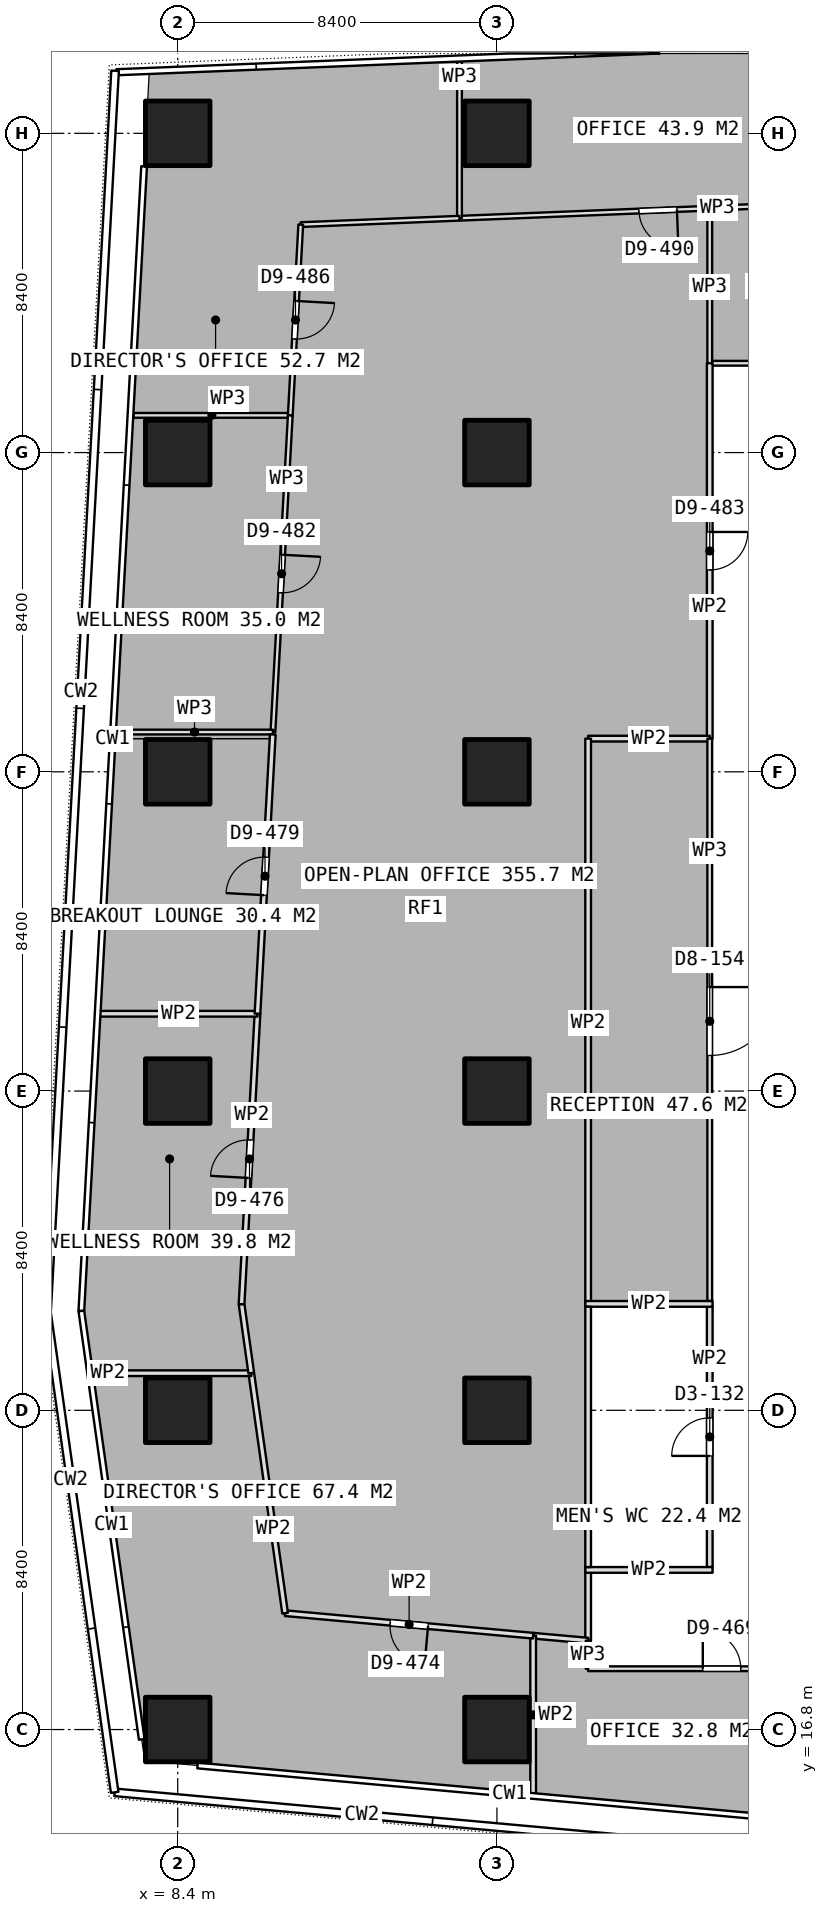
"""IFC4 building model, lengths in metres.
Left out: names, types, materials, properties, quantities, classifications, styles, units other than length and angle.
Written with IfcOpenShell. Run it as: python <this file> out.ifc"""

import sys

from ifc_helpers import new_model, si_unit, direction, frame, frame_2d, origin, origin_2d, place, context, subcontext, project, spatial, rectangle, extrude, element, fill, save


model = new_model("IFC4")
c1 = context("Model", 3, precision=1e-05, world=origin(), true_north=direction((0.0, 1.0)))
c2 = subcontext(c1, "Body", "Model", "MODEL_VIEW")
j1 = project(units=[si_unit("LENGTHUNIT", "METRE"), si_unit("PLANEANGLEUNIT", "RADIAN")], contexts=[c1])
p1 = place(None, origin())
s1 = spatial("IfcSite", under=j1, at=p1, CompositionType="ELEMENT")
p2 = place(p1, origin())
s2 = spatial("IfcBuilding", under=s1, at=p2, CompositionType="ELEMENT")
p3 = place(p2, frame((0.0, 0.0, 125.3)))
s3 = spatial("IfcBuildingStorey", under=s2, at=p3, CompositionType="ELEMENT", Elevation=125.3)
for number, where, z_axis, x_axis in (
    (1, (8.4, 16.8, 0.0), (0.0, 0.0, 1.0), (1.0, 0.0, 0.0)),
    (2, (8.4, 25.2, 0.0), (0.0, 0.0, 1.0), (1.0, 0.0, 0.0)),
    (3, (8.4, 33.6, 0.0), (0.0, 0.0, 1.0), (1.0, 0.0, 0.0)),
    (4, (8.4, 42.0, 0.0), (0.0, 0.0, 1.0), (1.0, 0.0, 0.0)),
    (5, (8.4, 50.4, 0.0), (0.0, 0.0, 1.0), (1.0, 0.0, 0.0)),
    (6, (8.4, 58.8, 0.0), (0.0, 0.0, 1.0), (1.0, 0.0, 0.0)),
    (7, (16.8, 16.8, 0.0), (0.0, 0.0, 1.0), (1.0, 0.0, 0.0)),
    (8, (16.8, 25.2, 0.0), (0.0, 0.0, 1.0), (1.0, 0.0, 0.0)),
    (9, (16.8, 33.6, 0.0), (0.0, 0.0, 1.0), (1.0, 0.0, 0.0)),
    (10, (16.8, 42.0, 0.0), (0.0, 0.0, 1.0), (1.0, 0.0, 0.0)),
    (11, (16.8, 50.4, 0.0), (0.0, 0.0, 1.0), (1.0, 0.0, 0.0)),
    (12, (16.8, 58.8, 0.0), (0.0, 0.0, 1.0), (1.0, 0.0, 0.0)),
):
    element("IfcColumn", number, at=place(p3, frame(where, z_axis=z_axis, x_axis=x_axis)), inside=s3, PredefinedType="COLUMN", context=c2, shape_type="SweptSolid", body=[
        extrude(rectangle(XDim=1.7, YDim=1.7, at=origin_2d()), origin(), (0.0, 0.0, 1.0), 3.75),
    ])
for number, where, z_axis, x_axis in (
    (13, (19.125, 21.0, 0.0), (0.0, 0.0, 1.0), (1.0, 0.0, 0.0)),
    (14, (19.125, 28.0, 0.0), (0.0, 0.0, 1.0), (1.0, 0.0, 0.0)),
):
    element("IfcWall", number, at=place(p3, frame(where, z_axis=z_axis, x_axis=x_axis)), inside=s3, PredefinedType="PARTITIONING", context=c2, shape_type="SweptSolid", body=[
        extrude(rectangle(XDim=3.35, YDim=0.15, at=frame_2d((1.675, 0.0))), origin(), (0.0, 0.0, 1.0), 3.5),
    ])
p4 = place(p3, frame((19.2, 21.075, 0.0), z_axis=(0.0, 0.0, 1.0), x_axis=(0.0, 1.0, 0.0)))
e15 = element("IfcWall", 15, at=p4, inside=s3, PredefinedType="PARTITIONING", context=c2, shape_type="SweptSolid", body=[
    extrude(rectangle(XDim=6.85, YDim=0.15, at=frame_2d((3.425, 0.0))), origin(), (0.0, 0.0, 1.0), 3.5),
])
p5 = place(p3, frame((22.4, 21.075, 0.0), z_axis=(0.0, 0.0, 1.0), x_axis=(0.0, 1.0, 0.0)))
e16 = element("IfcWall", 16, at=p5, inside=s3, PredefinedType="PARTITIONING", context=c2, shape_type="SweptSolid", body=[
    extrude(rectangle(XDim=6.85, YDim=0.15, at=frame_2d((3.425, 0.0))), origin(), (0.0, 0.0, 1.0), 3.5),
])
p6 = place(p5, frame((2.925, 0.0, 0.0)))
e17 = element("IfcOpeningElement", 17, at=p6, cuts=e16, PredefinedType="OPENING", context=c2, shape_type="SweptSolid", body=[
    extrude(rectangle(XDim=1.0, YDim=2.1, at=frame_2d((0.5, 1.05))), frame((0.0, 0.085, 0.0), z_axis=(0.0, -1.0, 0.0), x_axis=(1.0, 0.0, 0.0)), (0.0, 0.0, 1.0), 0.17),
])
p7 = place(p3, frame((26.257, 56.984, 0.0), z_axis=(0.0, 0.0, 1.0), x_axis=(-0.999199876108, -0.039995094524, 0.0)))
e18 = element("IfcWall", 18, at=p7, inside=s3, PredefinedType="PARTITIONING", context=c2, shape_type="SweptSolid", body=[
    extrude(rectangle(XDim=10.45, YDim=0.125, at=frame_2d((5.225, 0.0))), origin(), (0.0, 0.0, 1.0), 3.5),
])
p8 = place(p7, frame((4.725, 0.0, 0.0)))
e19 = element("IfcOpeningElement", 19, at=p8, cuts=e18, PredefinedType="OPENING", context=c2, shape_type="SweptSolid", body=[
    extrude(rectangle(XDim=1.0, YDim=2.1, at=frame_2d((0.5, 1.05))), frame((0.0, 0.073, 0.0), z_axis=(0.0, -1.0, 0.0), x_axis=(1.0, 0.0, 0.0)), (0.0, 0.0, 1.0), 0.145),
])
p9 = place(p3, frame((15.815, 56.566, 0.0), z_axis=(0.0, 0.0, 1.0), x_axis=(0.0, 1.0, 0.0)))
e20 = element("IfcWall", 20, at=p9, inside=s3, PredefinedType="PARTITIONING", context=c2, shape_type="SweptSolid", body=[
    extrude(rectangle(XDim=4.123, YDim=0.125, at=frame_2d((2.062, 0.0))), origin(), (0.0, 0.0, 1.0), 3.5),
])
p10 = place(p3, frame((11.362, 51.379, 0.0), z_axis=(0.0, 0.0, 1.0), x_axis=(-1.0, 0.0, 0.0)))
e21 = element("IfcWall", 21, at=p10, inside=s3, PredefinedType="PARTITIONING", context=c2, shape_type="SweptSolid", body=[
    extrude(rectangle(XDim=4.126, YDim=0.125, at=frame_2d((2.063, 0.0))), origin(), (0.0, 0.0, 1.0), 3.5),
])
p11 = place(p3, frame((15.814, 56.566, 0.0), z_axis=(0.0, 0.0, 1.0), x_axis=(-0.999192069217, -0.040189660545, 0.0)))
e22 = element("IfcWall", 22, at=p11, inside=s3, PredefinedType="PARTITIONING", context=c2, shape_type="SweptSolid", body=[
    extrude(rectangle(XDim=4.179, YDim=0.125, at=frame_2d((2.09, 0.0))), origin(), (0.0, 0.0, 1.0), 3.5),
])
p12 = place(p3, frame((11.638, 56.398, 0.0), z_axis=(0.0, 0.0, 1.0), x_axis=(-0.05488358881, -0.998492759953, 0.0)))
e23 = element("IfcWall", 23, at=p12, inside=s3, PredefinedType="PARTITIONING", context=c2, shape_type="SweptSolid", body=[
    extrude(rectangle(XDim=5.027, YDim=0.125, at=frame_2d((2.513, 0.0))), origin(), (0.0, 0.0, 1.0), 3.5),
])
p13 = place(p12, frame((2.013, 0.0, 0.0)))
e24 = element("IfcOpeningElement", 24, at=p13, cuts=e23, PredefinedType="OPENING", context=c2, shape_type="SweptSolid", body=[
    extrude(rectangle(XDim=1.0, YDim=2.1, at=frame_2d((0.5, 1.05))), frame((0.0, 0.073, 0.0), z_axis=(0.0, -1.0, 0.0), x_axis=(1.0, 0.0, 0.0)), (0.0, 0.0, 1.0), 0.145),
])
p14 = place(p3, frame((11.362, 51.378, 0.0), z_axis=(0.0, 0.0, 1.0), x_axis=(-0.054769987218, -0.998498997746, 0.0)))
e25 = element("IfcWall", 25, at=p14, inside=s3, PredefinedType="PARTITIONING", context=c2, shape_type="SweptSolid", body=[
    extrude(rectangle(XDim=8.344, YDim=0.125, at=frame_2d((4.172, 0.0))), origin(), (0.0, 0.0, 1.0), 3.5),
])
p15 = place(p14, frame((3.672, 0.0, 0.0)))
e26 = element("IfcOpeningElement", 26, at=p15, cuts=e25, PredefinedType="OPENING", context=c2, shape_type="SweptSolid", body=[
    extrude(rectangle(XDim=1.0, YDim=2.1, at=frame_2d((0.5, 1.05))), frame((0.0, 0.073, 0.0), z_axis=(0.0, -1.0, 0.0), x_axis=(1.0, 0.0, 0.0)), (0.0, 0.0, 1.0), 0.145),
])
p16 = place(p3, frame((10.905, 43.046, 0.0), z_axis=(0.0, 0.0, 1.0), x_axis=(-1.0, 0.0, 0.0)))
e27 = element("IfcWall", 27, at=p16, inside=s3, PredefinedType="PARTITIONING", context=c2, shape_type="SweptSolid", body=[
    extrude(rectangle(XDim=4.126, YDim=0.125, at=frame_2d((2.063, 0.0))), origin(), (0.0, 0.0, 1.0), 3.5),
])
p17 = place(p3, frame((29.6, 52.75, 0.0), z_axis=(0.0, 0.0, 1.0), x_axis=(-1.0, 0.0, 0.0)))
e28 = element("IfcWall", 28, at=p17, inside=s3, PredefinedType="PARTITIONING", context=c2, shape_type="SweptSolid", body=[
    extrude(rectangle(XDim=7.2, YDim=0.125, at=frame_2d((3.6, 0.0))), origin(), (0.0, 0.0, 1.0), 3.5),
])
p18 = place(p17, frame((3.1, 0.0, 0.0)))
e29 = element("IfcOpeningElement", 29, at=p18, cuts=e28, PredefinedType="OPENING", context=c2, shape_type="SweptSolid", body=[
    extrude(rectangle(XDim=1.0, YDim=2.1, at=frame_2d((0.5, 1.05))), frame((0.0, 0.073, 0.0), z_axis=(0.0, -1.0, 0.0), x_axis=(1.0, 0.0, 0.0)), (0.0, 0.0, 1.0), 0.145),
])
p19 = place(p3, frame((22.4, 52.75, 0.0), z_axis=(0.0, 0.0, 1.0), x_axis=(0.0, 1.0, 0.0)))
e30 = element("IfcWall", 30, at=p19, inside=s3, PredefinedType="PARTITIONING", context=c2, shape_type="SweptSolid", body=[
    extrude(rectangle(XDim=4.017, YDim=0.125, at=frame_2d((2.009, 0.0))), origin(), (0.0, 0.0, 1.0), 3.5),
])
p20 = place(p3, frame((22.4, 52.75, 0.0), z_axis=(0.0, 0.0, 1.0), x_axis=(0.0, -1.0, 0.0)))
e31 = element("IfcWall", 31, at=p20, inside=s3, PredefinedType="PARTITIONING", context=c2, shape_type="SweptSolid", body=[
    extrude(rectangle(XDim=9.877, YDim=0.15, at=frame_2d((4.938, 0.0))), origin(), (0.0, 0.0, 1.0), 3.5),
])
p21 = place(p20, frame((4.439, 0.0, 0.0)))
e32 = element("IfcOpeningElement", 32, at=p21, cuts=e31, PredefinedType="OPENING", context=c2, shape_type="SweptSolid", body=[
    extrude(rectangle(XDim=1.0, YDim=2.1, at=frame_2d((0.5, 1.05))), frame((0.0, 0.085, 0.0), z_axis=(0.0, -1.0, 0.0), x_axis=(1.0, 0.0, 0.0)), (0.0, 0.0, 1.0), 0.17),
])
p22 = place(p3, frame((22.4, 42.873, 0.0), z_axis=(0.0, 0.0, 1.0), x_axis=(-1.0, 0.0, 0.0)))
e33 = element("IfcWall", 33, at=p22, inside=s3, PredefinedType="PARTITIONING", context=c2, shape_type="SweptSolid", body=[
    extrude(rectangle(XDim=3.2, YDim=0.15, at=frame_2d((1.6, 0.0))), origin(), (0.0, 0.0, 1.0), 3.5),
])
p23 = place(p3, frame((19.2, 42.873, 0.0), z_axis=(0.0, 0.0, 1.0), x_axis=(0.0, -1.0, 0.0)))
e34 = element("IfcWall", 34, at=p23, inside=s3, PredefinedType="PARTITIONING", context=c2, shape_type="SweptSolid", body=[
    extrude(rectangle(XDim=14.948, YDim=0.15, at=frame_2d((7.474, 0.0))), origin(), (0.0, 0.0, 1.0), 3.5),
])
p24 = place(p3, frame((19.2, 21.075, 0.0), z_axis=(0.0, 0.0, 1.0), x_axis=(0.0, -1.0, 0.0)))
e35 = element("IfcWall", 35, at=p24, inside=s3, PredefinedType="PARTITIONING", context=c2, shape_type="SweptSolid", body=[
    extrude(rectangle(XDim=1.937, YDim=0.15, at=frame_2d((0.969, 0.0))), origin(), (0.0, 0.0, 1.0), 3.5),
])
p25 = place(p3, frame((19.2, 19.138, 0.0), z_axis=(0.0, 0.0, 1.0), x_axis=(-0.995920706464, 0.090232734836, 0.0)))
e36 = element("IfcWall", 36, at=p25, inside=s3, PredefinedType="PARTITIONING", context=c2, shape_type="SweptSolid", body=[
    extrude(rectangle(XDim=1.453, YDim=0.15, at=frame_2d((0.727, 0.0))), origin(), (0.0, 0.0, 1.0), 3.5),
])
p26 = place(p3, frame((17.753, 19.269, 0.0), z_axis=(0.0, 0.0, 1.0), x_axis=(0.0, -1.0, 0.0)))
e37 = element("IfcWall", 37, at=p26, inside=s3, PredefinedType="PARTITIONING", context=c2, shape_type="SweptSolid", body=[
    extrude(rectangle(XDim=4.167, YDim=0.15, at=frame_2d((2.083, 0.0))), origin(), (0.0, 0.0, 1.0), 3.5),
])
p27 = place(p3, frame((17.752, 19.269, 0.0), z_axis=(0.0, 0.0, 1.0), x_axis=(-0.995896565077, 0.090498793736, 0.0)))
e38 = element("IfcWall", 38, at=p27, inside=s3, PredefinedType="PARTITIONING", context=c2, shape_type="SweptSolid", body=[
    extrude(rectangle(XDim=6.553, YDim=0.15, at=frame_2d((3.276, 0.0))), origin(), (0.0, 0.0, 1.0), 3.5),
])
p28 = place(p27, frame((2.776, 0.0, 0.0)))
e39 = element("IfcOpeningElement", 39, at=p28, cuts=e38, PredefinedType="OPENING", context=c2, shape_type="SweptSolid", body=[
    extrude(rectangle(XDim=1.0, YDim=2.1, at=frame_2d((0.5, 1.05))), frame((0.0, 0.085, 0.0), z_axis=(0.0, -1.0, 0.0), x_axis=(1.0, 0.0, 0.0)), (0.0, 0.0, 1.0), 0.17),
])
p29 = place(p3, frame((11.226, 19.862, 0.0), z_axis=(0.0, 0.0, 1.0), x_axis=(-0.13959860056, 0.990208175447, 0.0)))
e40 = element("IfcWall", 40, at=p29, inside=s3, PredefinedType="PARTITIONING", context=c2, shape_type="SweptSolid", body=[
    extrude(rectangle(XDim=6.376, YDim=0.15, at=frame_2d((3.188, 0.0))), origin(), (0.0, 0.0, 1.0), 3.5),
])
p30 = place(p3, frame((10.336, 26.176, 0.0), z_axis=(0.0, 0.0, 1.0), x_axis=(-1.0, 0.0, 0.0)))
e41 = element("IfcWall", 41, at=p30, inside=s3, PredefinedType="PARTITIONING", context=c2, shape_type="SweptSolid", body=[
    extrude(rectangle(XDim=4.191, YDim=0.15, at=frame_2d((2.095, 0.0))), origin(), (0.0, 0.0, 1.0), 3.5),
])
p31 = place(p3, frame((10.336, 26.177, 0.0), z_axis=(0.0, 0.0, 1.0), x_axis=(-0.139520002301, 0.990219252973, 0.0)))
e42 = element("IfcWall", 42, at=p31, inside=s3, PredefinedType="PARTITIONING", context=c2, shape_type="SweptSolid", body=[
    extrude(rectangle(XDim=1.834, YDim=0.15, at=frame_2d((0.917, 0.0))), origin(), (0.0, 0.0, 1.0), 3.5),
])
p32 = place(p3, frame((10.08, 27.993, 0.0), z_axis=(0.0, 0.0, 1.0), x_axis=(0.054745561338, 0.998500337263, 0.0)))
e43 = element("IfcWall", 43, at=p32, inside=s3, PredefinedType="PARTITIONING", context=c2, shape_type="SweptSolid", body=[
    extrude(rectangle(XDim=7.653, YDim=0.15, at=frame_2d((3.826, 0.0))), origin(), (0.0, 0.0, 1.0), 3.5),
])
p33 = place(p32, frame((3.326, 0.0, 0.0)))
e44 = element("IfcOpeningElement", 44, at=p33, cuts=e43, PredefinedType="OPENING", context=c2, shape_type="SweptSolid", body=[
    extrude(rectangle(XDim=1.0, YDim=2.1, at=frame_2d((0.5, 1.05))), frame((0.0, 0.085, 0.0), z_axis=(0.0, -1.0, 0.0), x_axis=(1.0, 0.0, 0.0)), (0.0, 0.0, 1.0), 0.17),
])
p34 = place(p3, frame((10.499, 35.634, 0.0), z_axis=(0.0, 0.0, 1.0), x_axis=(-1.0, 0.0, 0.0)))
e45 = element("IfcWall", 45, at=p34, inside=s3, PredefinedType="PARTITIONING", context=c2, shape_type="SweptSolid", body=[
    extrude(rectangle(XDim=4.156, YDim=0.15, at=frame_2d((2.078, 0.0))), origin(), (0.0, 0.0, 1.0), 3.5),
])
p35 = place(p3, frame((10.499, 35.635, 0.0), z_axis=(0.0, 0.0, 1.0), x_axis=(0.054773615864, 0.9984987987, 0.0)))
e46 = element("IfcWall", 46, at=p35, inside=s3, PredefinedType="PARTITIONING", context=c2, shape_type="SweptSolid", body=[
    extrude(rectangle(XDim=7.359, YDim=0.15, at=frame_2d((3.679, 0.0))), origin(), (0.0, 0.0, 1.0), 3.5),
])
p36 = place(p35, frame((3.124, 0.0, 0.0)))
e47 = element("IfcOpeningElement", 47, at=p36, cuts=e46, PredefinedType="OPENING", context=c2, shape_type="SweptSolid", body=[
    extrude(rectangle(XDim=1.0, YDim=2.1, at=frame_2d((0.5, 1.05))), frame((0.0, 0.085, 0.0), z_axis=(0.0, -1.0, 0.0), x_axis=(1.0, 0.0, 0.0)), (0.0, 0.0, 1.0), 0.17),
])
p37 = place(p3, frame((19.2, 19.138, 0.0), z_axis=(0.0, 0.0, 1.0), x_axis=(0.0, -1.0, 0.0)))
e48 = element("IfcWall", 48, at=p37, inside=s3, PredefinedType="PARTITIONING", context=c2, shape_type="SweptSolid", body=[
    extrude(rectangle(XDim=0.738, YDim=0.125, at=frame_2d((0.369, 0.0))), origin(), (0.0, 0.0, 1.0), 3.5),
])
p38 = place(p3, frame((19.2, 18.4, 0.0), z_axis=(0.0, 0.0, 1.0), x_axis=(1.0, 0.0, 0.0)))
e49 = element("IfcWall", 49, at=p38, inside=s3, PredefinedType="PARTITIONING", context=c2, shape_type="SweptSolid", body=[
    extrude(rectangle(XDim=7.034, YDim=0.125, at=frame_2d((3.517, 0.0))), origin(), (0.0, 0.0, 1.0), 3.5),
])
p39 = place(p38, frame((3.017, 0.0, 0.0)))
e50 = element("IfcOpeningElement", 50, at=p39, cuts=e49, PredefinedType="OPENING", context=c2, shape_type="SweptSolid", body=[
    extrude(rectangle(XDim=1.0, YDim=2.1, at=frame_2d((0.5, 1.05))), frame((0.0, 0.073, 0.0), z_axis=(0.0, -1.0, 0.0), x_axis=(1.0, 0.0, 0.0)), (0.0, 0.0, 1.0), 0.145),
])
p40 = place(p3, frame((22.4, 42.872, 0.0), z_axis=(0.0, 0.0, 1.0), x_axis=(0.0, -1.0, 0.0)))
e51 = element("IfcWall", 51, at=p40, inside=s3, PredefinedType="PARTITIONING", context=c2, shape_type="SweptSolid", body=[
    extrude(rectangle(XDim=14.797, YDim=0.125, at=frame_2d((7.398, 0.0))), origin(), (0.0, 0.0, 1.0), 3.5),
])
p41 = place(p40, frame((6.536, 0.0, 0.0)))
e52 = element("IfcOpeningElement", 52, at=p41, cuts=e51, PredefinedType="OPENING", context=c2, shape_type="SweptSolid", body=[
    extrude(rectangle(XDim=1.8, YDim=2.1, at=frame_2d((0.9, 1.05))), frame((0.0, 0.073, 0.0), z_axis=(0.0, -1.0, 0.0), x_axis=(1.0, 0.0, 0.0)), (0.0, 0.0, 1.0), 0.145),
])
p42 = place(p6, origin())
e53 = element("IfcDoor", 53, at=p42, inside=s3, OperationType="SINGLE_SWING_LEFT", PredefinedType="DOOR", context=c2, shape_type="SweptSolid", body=[
    extrude(rectangle(XDim=1.0, YDim=2.1, at=frame_2d((0.5, 1.05))), frame((0.0, 0.025, 0.0), z_axis=(0.0, -1.0, 0.0), x_axis=(1.0, 0.0, 0.0)), (0.0, 0.0, 1.0), 0.05),
])
fill(e17, e53)
p43 = place(p8, origin())
e54 = element("IfcDoor", 54, at=p43, inside=s3, OperationType="SINGLE_SWING_LEFT", PredefinedType="DOOR", context=c2, shape_type="SweptSolid", body=[
    extrude(rectangle(XDim=1.0, YDim=2.1, at=frame_2d((0.5, 1.05))), frame((0.0, 0.025, 0.0), z_axis=(0.0, -1.0, 0.0), x_axis=(1.0, 0.0, 0.0)), (0.0, 0.0, 1.0), 0.05),
])
fill(e19, e54)
p44 = place(p13, origin())
e55 = element("IfcDoor", 55, at=p44, inside=s3, OperationType="SINGLE_SWING_LEFT", PredefinedType="DOOR", context=c2, shape_type="SweptSolid", body=[
    extrude(rectangle(XDim=1.0, YDim=2.1, at=frame_2d((0.5, 1.05))), frame((0.0, 0.025, 0.0), z_axis=(0.0, -1.0, 0.0), x_axis=(1.0, 0.0, 0.0)), (0.0, 0.0, 1.0), 0.05),
])
fill(e24, e55)
p45 = place(p15, origin())
e56 = element("IfcDoor", 56, at=p45, inside=s3, OperationType="SINGLE_SWING_LEFT", PredefinedType="DOOR", context=c2, shape_type="SweptSolid", body=[
    extrude(rectangle(XDim=1.0, YDim=2.1, at=frame_2d((0.5, 1.05))), frame((0.0, 0.025, 0.0), z_axis=(0.0, -1.0, 0.0), x_axis=(1.0, 0.0, 0.0)), (0.0, 0.0, 1.0), 0.05),
])
fill(e26, e56)
p46 = place(p21, origin())
e57 = element("IfcDoor", 57, at=p46, inside=s3, OperationType="SINGLE_SWING_LEFT", PredefinedType="DOOR", context=c2, shape_type="SweptSolid", body=[
    extrude(rectangle(XDim=1.0, YDim=2.1, at=frame_2d((0.5, 1.05))), frame((0.0, 0.025, 0.0), z_axis=(0.0, -1.0, 0.0), x_axis=(1.0, 0.0, 0.0)), (0.0, 0.0, 1.0), 0.05),
])
fill(e32, e57)
p47 = place(p36, origin())
e58 = element("IfcDoor", 58, at=p47, inside=s3, OperationType="SINGLE_SWING_LEFT", PredefinedType="DOOR", context=c2, shape_type="SweptSolid", body=[
    extrude(rectangle(XDim=1.0, YDim=2.1, at=frame_2d((0.5, 1.05))), frame((0.0, 0.025, 0.0), z_axis=(0.0, -1.0, 0.0), x_axis=(1.0, 0.0, 0.0)), (0.0, 0.0, 1.0), 0.05),
])
fill(e47, e58)
p48 = place(p33, origin())
e59 = element("IfcDoor", 59, at=p48, inside=s3, OperationType="SINGLE_SWING_LEFT", PredefinedType="DOOR", context=c2, shape_type="SweptSolid", body=[
    extrude(rectangle(XDim=1.0, YDim=2.1, at=frame_2d((0.5, 1.05))), frame((0.0, 0.025, 0.0), z_axis=(0.0, -1.0, 0.0), x_axis=(1.0, 0.0, 0.0)), (0.0, 0.0, 1.0), 0.05),
])
fill(e44, e59)
p49 = place(p28, origin())
e60 = element("IfcDoor", 60, at=p49, inside=s3, OperationType="SINGLE_SWING_LEFT", PredefinedType="DOOR", context=c2, shape_type="SweptSolid", body=[
    extrude(rectangle(XDim=1.0, YDim=2.1, at=frame_2d((0.5, 1.05))), frame((0.0, 0.025, 0.0), z_axis=(0.0, -1.0, 0.0), x_axis=(1.0, 0.0, 0.0)), (0.0, 0.0, 1.0), 0.05),
])
fill(e39, e60)
p50 = place(p39, origin())
e61 = element("IfcDoor", 61, at=p50, inside=s3, OperationType="SINGLE_SWING_LEFT", PredefinedType="DOOR", context=c2, shape_type="SweptSolid", body=[
    extrude(rectangle(XDim=1.0, YDim=2.1, at=frame_2d((0.5, 1.05))), frame((0.0, 0.025, 0.0), z_axis=(0.0, -1.0, 0.0), x_axis=(1.0, 0.0, 0.0)), (0.0, 0.0, 1.0), 0.05),
])
fill(e50, e61)
p51 = place(p41, origin())
e62 = element("IfcDoor", 62, at=p51, inside=s3, OperationType="DOUBLE_DOOR_SINGLE_SWING", PredefinedType="DOOR", context=c2, shape_type="SweptSolid", body=[
    extrude(rectangle(XDim=1.8, YDim=2.1, at=frame_2d((0.9, 1.05))), frame((0.0, 0.025, 0.0), z_axis=(0.0, -1.0, 0.0), x_axis=(1.0, 0.0, 0.0)), (0.0, 0.0, 1.0), 0.05),
])
fill(e52, e62)
save(model, sys.argv[1])
